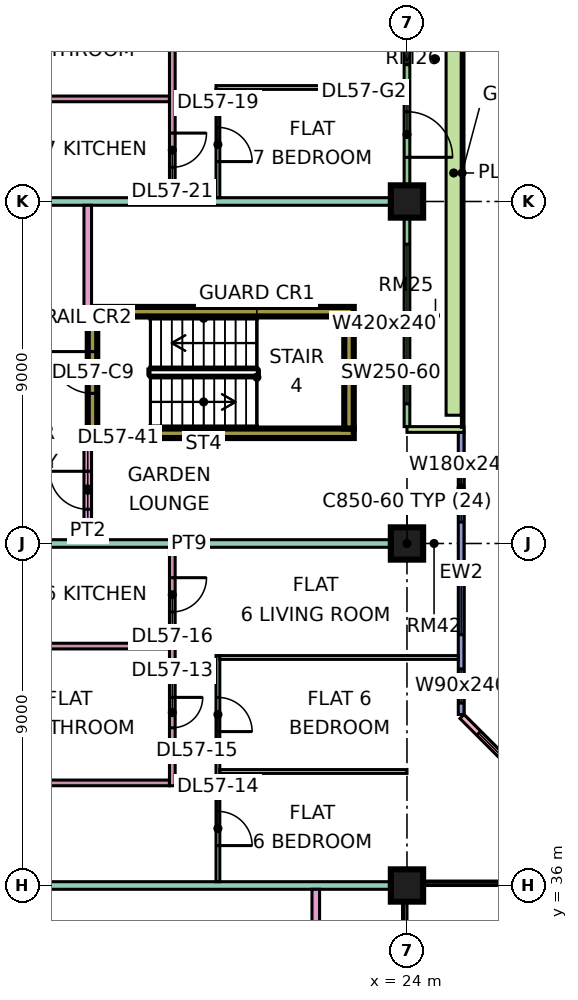
"""IFC4 building model, lengths in metres.
Left out: names, types, materials, properties, quantities, classifications, styles, units other than length and angle.
Written with IfcOpenShell. Run it as: python <this file> out.ifc"""

import sys

from ifc_helpers import new_model, si_unit, direction, frame, frame_2d, origin, origin_2d, place, context, subcontext, project, spatial, rectangle, extrude, element, fill, save


model = new_model("IFC4")
c1 = context("Model", 3, precision=1e-05, world=origin(), true_north=direction((0.0, 1.0)))
c2 = subcontext(c1, "Body", "Model", "MODEL_VIEW")
j1 = project(units=[si_unit("LENGTHUNIT", "METRE"), si_unit("PLANEANGLEUNIT", "RADIAN")], contexts=[c1])
p1 = place(None, origin())
s1 = spatial("IfcSite", under=j1, at=p1, CompositionType="ELEMENT")
p2 = place(p1, origin())
s2 = spatial("IfcBuilding", under=s1, at=p2, CompositionType="ELEMENT")
p3 = place(p2, frame((0.0, 0.0, 241.65)))
s3 = spatial("IfcBuildingStorey", under=s2, at=p3, CompositionType="ELEMENT", Elevation=241.65)
for number, where, z_axis, x_axis in (
    (1, (24.0, 36.0, 0.0), (0.0, 0.0, 1.0), (1.0, 0.0, 0.0)),
    (2, (24.0, 45.0, 0.0), (0.0, 0.0, 1.0), (1.0, 0.0, 0.0)),
    (3, (24.0, 54.0, 0.0), (0.0, 0.0, 1.0), (1.0, 0.0, 0.0)),
):
    element("IfcColumn", number, at=place(p3, frame(where, z_axis=z_axis, x_axis=x_axis)), inside=s3, PredefinedType="COLUMN", context=c2, shape_type="SweptSolid", body=[
        extrude(rectangle(XDim=0.85, YDim=0.85, at=origin_2d()), origin(), (0.0, 0.0, 1.0), 3.75),
    ])
for number, where, z_axis, x_axis in (
    (4, (15.6, 47.9, 0.0), (0.0, 0.0, 1.0), (1.0, 0.0, 0.0)),
    (5, (15.6, 51.1, 0.0), (0.0, 0.0, 1.0), (1.0, 0.0, 0.0)),
):
    element("IfcWall", number, at=place(p3, frame(where, z_axis=z_axis, x_axis=x_axis)), inside=s3, PredefinedType="SHEAR", context=c2, shape_type="SweptSolid", body=[
        extrude(rectangle(XDim=7.0, YDim=0.25, at=frame_2d((3.5, 0.0))), origin(), (0.0, 0.0, 1.0), 3.75),
    ])
p4 = place(p3, frame((15.725, 48.025, 0.0), z_axis=(0.0, 0.0, 1.0), x_axis=(0.0, 1.0, 0.0)))
e6 = element("IfcWall", 6, at=p4, inside=s3, PredefinedType="SHEAR", context=c2, shape_type="SweptSolid", body=[
    extrude(rectangle(XDim=2.95, YDim=0.25, at=frame_2d((1.475, 0.0))), origin(), (0.0, 0.0, 1.0), 3.75),
])
p5 = place(p4, frame((0.925, 0.0, 0.0)))
e7 = element("IfcOpeningElement", 7, at=p5, cuts=e6, PredefinedType="OPENING", context=c2, shape_type="SweptSolid", body=[
    extrude(rectangle(XDim=1.1, YDim=2.2, at=frame_2d((0.55, 1.1))), frame((0.0, 0.135, 0.0), z_axis=(0.0, -1.0, 0.0), x_axis=(1.0, 0.0, 0.0)), (0.0, 0.0, 1.0), 0.27),
])
p6 = place(p3, frame((22.475, 48.025, 0.0), z_axis=(0.0, 0.0, 1.0), x_axis=(0.0, 1.0, 0.0)))
e8 = element("IfcWall", 8, at=p6, inside=s3, PredefinedType="SHEAR", context=c2, shape_type="SweptSolid", body=[
    extrude(rectangle(XDim=2.95, YDim=0.25, at=frame_2d((1.475, 0.0))), origin(), (0.0, 0.0, 1.0), 3.75),
])
p7 = place(p3, frame((28.447, 37.447, 0.0), z_axis=(0.0, 0.0, 1.0), x_axis=(-0.707106781187, 0.707106781187, 0.0)))
e9 = element("IfcWall", 9, at=p7, inside=s3, PredefinedType="SOLIDWALL", context=c2, shape_type="SweptSolid", body=[
    extrude(rectangle(XDim=4.243, YDim=0.15, at=frame_2d((2.121, 0.0))), origin(), (0.0, 0.0, 1.0), 3.35),
])
p8 = place(p7, frame((0.621, 0.0, 0.45)))
e10 = element("IfcOpeningElement", 10, at=p8, cuts=e9, PredefinedType="OPENING", context=c2, shape_type="SweptSolid", body=[
    extrude(rectangle(XDim=3.0, YDim=2.4, at=frame_2d((1.5, 1.2))), frame((0.0, 0.085, 0.0), z_axis=(0.0, -1.0, 0.0), x_axis=(1.0, 0.0, 0.0)), (0.0, 0.0, 1.0), 0.17),
])
p9 = place(p3, frame((25.425, 40.5, 0.0), z_axis=(0.0, 0.0, 1.0), x_axis=(0.0, 1.0, 0.0)))
e11 = element("IfcWall", 11, at=p9, inside=s3, PredefinedType="SOLIDWALL", context=c2, shape_type="SweptSolid", body=[
    extrude(rectangle(XDim=7.425, YDim=0.15, at=frame_2d((3.712, 0.0))), origin(), (0.0, 0.0, 1.0), 3.35),
])
p10 = place(p9, frame((0.3, 0.0, 0.45)))
e12 = element("IfcOpeningElement", 12, at=p10, cuts=e11, PredefinedType="OPENING", context=c2, shape_type="SweptSolid", body=[
    extrude(rectangle(XDim=0.9, YDim=2.4, at=frame_2d((0.45, 1.2))), frame((0.0, 0.085, 0.0), z_axis=(0.0, -1.0, 0.0), x_axis=(1.0, 0.0, 0.0)), (0.0, 0.0, 1.0), 0.17),
])
p11 = place(p9, frame((2.1, 0.0, 0.45)))
e13 = element("IfcOpeningElement", 13, at=p11, cuts=e11, PredefinedType="OPENING", context=c2, shape_type="SweptSolid", body=[
    extrude(rectangle(XDim=1.8, YDim=2.4, at=frame_2d((0.9, 1.2))), frame((0.0, 0.085, 0.0), z_axis=(0.0, -1.0, 0.0), x_axis=(1.0, 0.0, 0.0)), (0.0, 0.0, 1.0), 0.17),
])
p12 = place(p9, frame((5.062, 0.0, 0.45)))
e14 = element("IfcOpeningElement", 14, at=p12, cuts=e11, PredefinedType="OPENING", context=c2, shape_type="SweptSolid", body=[
    extrude(rectangle(XDim=1.8, YDim=2.4, at=frame_2d((0.9, 1.2))), frame((0.0, 0.085, 0.0), z_axis=(0.0, -1.0, 0.0), x_axis=(1.0, 0.0, 0.0)), (0.0, 0.0, 1.0), 0.17),
])
p13 = place(p3, frame((24.0, 48.075, 0.0), z_axis=(0.0, 0.0, 1.0), x_axis=(0.0, 1.0, 0.0)))
e15 = element("IfcWall", 15, at=p13, inside=s3, PredefinedType="SOLIDWALL", context=c2, shape_type="SweptSolid", body=[
    extrude(rectangle(XDim=13.35, YDim=0.15, at=frame_2d((6.675, 0.0))), origin(), (0.0, 0.0, 1.0), 3.35),
])
p14 = place(p13, frame((0.6, 0.0, 0.45)))
e16 = element("IfcOpeningElement", 16, at=p14, cuts=e15, PredefinedType="OPENING", context=c2, shape_type="SweptSolid", body=[
    extrude(rectangle(XDim=4.2, YDim=2.4, at=frame_2d((2.1, 1.2))), frame((0.0, 0.085, 0.0), z_axis=(0.0, -1.0, 0.0), x_axis=(1.0, 0.0, 0.0)), (0.0, 0.0, 1.0), 0.17),
])
p15 = place(p13, frame((7.087, 0.0, 0.0)))
e17 = element("IfcOpeningElement", 17, at=p15, cuts=e15, PredefinedType="OPENING", context=c2, shape_type="SweptSolid", body=[
    extrude(rectangle(XDim=1.2, YDim=2.4, at=frame_2d((0.6, 1.2))), frame((0.0, 0.085, 0.0), z_axis=(0.0, -1.0, 0.0), x_axis=(1.0, 0.0, 0.0)), (0.0, 0.0, 1.0), 0.17),
])
p16 = place(p13, frame((9.525, 0.0, 0.45)))
e18 = element("IfcOpeningElement", 18, at=p16, cuts=e15, PredefinedType="OPENING", context=c2, shape_type="SweptSolid", body=[
    extrude(rectangle(XDim=1.8, YDim=2.4, at=frame_2d((0.9, 1.2))), frame((0.0, 0.085, 0.0), z_axis=(0.0, -1.0, 0.0), x_axis=(1.0, 0.0, 0.0)), (0.0, 0.0, 1.0), 0.17),
])
p17 = place(p13, frame((12.188, 0.0, 0.45)))
e19 = element("IfcOpeningElement", 19, at=p17, cuts=e15, PredefinedType="OPENING", context=c2, shape_type="SweptSolid", body=[
    extrude(rectangle(XDim=0.9, YDim=2.4, at=frame_2d((0.45, 1.2))), frame((0.0, 0.085, 0.0), z_axis=(0.0, -1.0, 0.0), x_axis=(1.0, 0.0, 0.0)), (0.0, 0.0, 1.0), 0.17),
])
p18 = place(p3, frame((25.5, 48.0, 0.0), z_axis=(0.0, 0.0, 1.0), x_axis=(-1.0, 0.0, 0.0)))
e20 = element("IfcWall", 20, at=p18, inside=s3, PredefinedType="SOLIDWALL", context=c2, shape_type="SweptSolid", body=[
    extrude(rectangle(XDim=1.5, YDim=0.15, at=frame_2d((0.75, 0.0))), origin(), (0.0, 0.0, 1.0), 3.35),
])
p19 = place(p3, frame((25.229, 48.375, 0.0), z_axis=(0.0, 0.0, 1.0), x_axis=(0.0, 1.0, 0.0)))
e21 = element("IfcWall", 21, at=p19, inside=s3, PredefinedType="SOLIDWALL", context=c2, shape_type="SweptSolid", body=[
    extrude(rectangle(XDim=12.75, YDim=0.4, at=frame_2d((6.375, 0.0))), origin(), (0.0, 0.0, 1.0), 0.7),
])
p20 = place(p3, frame((12.525, 36.0, 0.0), z_axis=(0.0, 0.0, 1.0), x_axis=(1.0, 0.0, 0.0)))
e22 = element("IfcWall", 22, at=p20, inside=s3, PredefinedType="PARTITIONING", context=c2, shape_type="SweptSolid", body=[
    extrude(rectangle(XDim=11.475, YDim=0.2, at=frame_2d((5.738, 0.0))), origin(), (0.0, 0.0, 1.0), 3.35),
])
for number, where, z_axis, x_axis in (
    (23, (12.525, 38.7, 0.0), (0.0, 0.0, 1.0), (1.0, 0.0, 0.0)),
    (24, (12.525, 42.3, 0.0), (0.0, 0.0, 1.0), (1.0, 0.0, 0.0)),
):
    element("IfcWall", number, at=place(p3, frame(where, z_axis=z_axis, x_axis=x_axis)), inside=s3, PredefinedType="PARTITIONING", context=c2, shape_type="SweptSolid", body=[
        extrude(rectangle(XDim=5.225, YDim=0.15, at=frame_2d((2.613, 0.0))), origin(), (0.0, 0.0, 1.0), 3.35),
    ])
p21 = place(p3, frame((12.525, 45.0, 0.0), z_axis=(0.0, 0.0, 1.0), x_axis=(1.0, 0.0, 0.0)))
e25 = element("IfcWall", 25, at=p21, inside=s3, PredefinedType="PARTITIONING", context=c2, shape_type="SweptSolid", body=[
    extrude(rectangle(XDim=11.475, YDim=0.2, at=frame_2d((5.738, 0.0))), origin(), (0.0, 0.0, 1.0), 3.35),
])
p22 = place(p3, frame((12.525, 54.0, 0.0), z_axis=(0.0, 0.0, 1.0), x_axis=(1.0, 0.0, 0.0)))
e26 = element("IfcWall", 26, at=p22, inside=s3, PredefinedType="PARTITIONING", context=c2, shape_type="SweptSolid", body=[
    extrude(rectangle(XDim=11.401, YDim=0.2, at=frame_2d((5.701, 0.0))), origin(), (0.0, 0.0, 1.0), 3.35),
])
p23 = place(p3, frame((12.525, 56.7, 0.0), z_axis=(0.0, 0.0, 1.0), x_axis=(1.0, 0.0, 0.0)))
e27 = element("IfcWall", 27, at=p23, inside=s3, PredefinedType="PARTITIONING", context=c2, shape_type="SweptSolid", body=[
    extrude(rectangle(XDim=5.225, YDim=0.15, at=frame_2d((2.613, 0.0))), origin(), (0.0, 0.0, 1.0), 3.35),
])
p24 = place(p3, frame((15.6, 45.1, 0.0), z_axis=(0.0, 0.0, 1.0), x_axis=(0.0, 1.0, 0.0)))
e28 = element("IfcWall", 28, at=p24, inside=s3, PredefinedType="PARTITIONING", context=c2, shape_type="SweptSolid", body=[
    extrude(rectangle(XDim=2.675, YDim=0.2, at=frame_2d((1.337, 0.0))), origin(), (0.0, 0.0, 1.0), 3.35),
])
p25 = place(p24, frame((0.8, 0.0, 0.0)))
e29 = element("IfcOpeningElement", 29, at=p25, cuts=e28, PredefinedType="OPENING", context=c2, shape_type="SweptSolid", body=[
    extrude(rectangle(XDim=1.0, YDim=2.1, at=frame_2d((0.5, 1.05))), frame((0.0, 0.11, 0.0), z_axis=(0.0, -1.0, 0.0), x_axis=(1.0, 0.0, 0.0)), (0.0, 0.0, 1.0), 0.22),
])
p26 = place(p3, frame((15.6, 51.225, 0.0), z_axis=(0.0, 0.0, 1.0), x_axis=(0.0, 1.0, 0.0)))
e30 = element("IfcWall", 30, at=p26, inside=s3, PredefinedType="PARTITIONING", context=c2, shape_type="SweptSolid", body=[
    extrude(rectangle(XDim=2.675, YDim=0.2, at=frame_2d((1.337, 0.0))), origin(), (0.0, 0.0, 1.0), 3.35),
])
p27 = place(p3, frame((17.825, 38.625, 0.0), z_axis=(0.0, 0.0, 1.0), x_axis=(0.0, 1.0, 0.0)))
e31 = element("IfcWall", 31, at=p27, inside=s3, PredefinedType="PARTITIONING", context=c2, shape_type="SweptSolid", body=[
    extrude(rectangle(XDim=6.275, YDim=0.15, at=frame_2d((3.137, 0.0))), origin(), (0.0, 0.0, 1.0), 3.35),
])
p28 = place(p27, frame((1.525, 0.0, 0.0)))
e32 = element("IfcOpeningElement", 32, at=p28, cuts=e31, PredefinedType="OPENING", context=c2, shape_type="SweptSolid", body=[
    extrude(rectangle(XDim=0.8, YDim=2.1, at=frame_2d((0.4, 1.05))), frame((0.0, 0.085, 0.0), z_axis=(0.0, -1.0, 0.0), x_axis=(1.0, 0.0, 0.0)), (0.0, 0.0, 1.0), 0.17),
])
p29 = place(p27, frame((4.575, 0.0, 0.0)))
e33 = element("IfcOpeningElement", 33, at=p29, cuts=e31, PredefinedType="OPENING", context=c2, shape_type="SweptSolid", body=[
    extrude(rectangle(XDim=0.9, YDim=2.1, at=frame_2d((0.45, 1.05))), frame((0.0, 0.085, 0.0), z_axis=(0.0, -1.0, 0.0), x_axis=(1.0, 0.0, 0.0)), (0.0, 0.0, 1.0), 0.17),
])
p30 = place(p3, frame((17.825, 54.1, 0.0), z_axis=(0.0, 0.0, 1.0), x_axis=(0.0, 1.0, 0.0)))
e34 = element("IfcWall", 34, at=p30, inside=s3, PredefinedType="PARTITIONING", context=c2, shape_type="SweptSolid", body=[
    extrude(rectangle(XDim=5.975, YDim=0.15, at=frame_2d((2.987, 0.0))), origin(), (0.0, 0.0, 1.0), 3.35),
])
p31 = place(p30, frame((3.9, 0.0, 0.0)))
e35 = element("IfcOpeningElement", 35, at=p31, cuts=e34, PredefinedType="OPENING", context=c2, shape_type="SweptSolid", body=[
    extrude(rectangle(XDim=0.8, YDim=2.1, at=frame_2d((0.4, 1.05))), frame((0.0, 0.085, 0.0), z_axis=(0.0, -1.0, 0.0), x_axis=(1.0, 0.0, 0.0)), (0.0, 0.0, 1.0), 0.17),
])
p32 = place(p30, frame((0.8, 0.0, 0.0)))
e36 = element("IfcOpeningElement", 36, at=p32, cuts=e34, PredefinedType="OPENING", context=c2, shape_type="SweptSolid", body=[
    extrude(rectangle(XDim=0.9, YDim=2.1, at=frame_2d((0.45, 1.05))), frame((0.0, 0.085, 0.0), z_axis=(0.0, -1.0, 0.0), x_axis=(1.0, 0.0, 0.0)), (0.0, 0.0, 1.0), 0.17),
])
p33 = place(p3, frame((18.975, 57.0, 0.0), z_axis=(0.0, 0.0, 1.0), x_axis=(1.0, 0.0, 0.0)))
e37 = element("IfcWall", 37, at=p33, inside=s3, PredefinedType="PARTITIONING", context=c2, shape_type="SweptSolid", body=[
    extrude(rectangle(XDim=4.951, YDim=0.1, at=frame_2d((2.476, 0.0))), origin(), (0.0, 0.0, 1.0), 3.35),
])
p34 = place(p3, frame((19.025, 36.1, 0.0), z_axis=(0.0, 0.0, 1.0), x_axis=(0.0, 1.0, 0.0)))
e38 = element("IfcWall", 38, at=p34, inside=s3, PredefinedType="PARTITIONING", context=c2, shape_type="SweptSolid", body=[
    extrude(rectangle(XDim=5.95, YDim=0.1, at=frame_2d((2.975, 0.0))), origin(), (0.0, 0.0, 1.0), 3.35),
])
p35 = place(p34, frame((0.95, 0.0, 0.0)))
e39 = element("IfcOpeningElement", 39, at=p35, cuts=e38, PredefinedType="OPENING", context=c2, shape_type="SweptSolid", body=[
    extrude(rectangle(XDim=0.9, YDim=2.1, at=frame_2d((0.45, 1.05))), frame((0.0, 0.06, 0.0), z_axis=(0.0, -1.0, 0.0), x_axis=(1.0, 0.0, 0.0)), (0.0, 0.0, 1.0), 0.12),
])
p36 = place(p34, frame((3.95, 0.0, 0.0)))
e40 = element("IfcOpeningElement", 40, at=p36, cuts=e38, PredefinedType="OPENING", context=c2, shape_type="SweptSolid", body=[
    extrude(rectangle(XDim=0.9, YDim=2.1, at=frame_2d((0.45, 1.05))), frame((0.0, 0.06, 0.0), z_axis=(0.0, -1.0, 0.0), x_axis=(1.0, 0.0, 0.0)), (0.0, 0.0, 1.0), 0.12),
])
p37 = place(p3, frame((19.025, 54.1, 0.0), z_axis=(0.0, 0.0, 1.0), x_axis=(0.0, 1.0, 0.0)))
e41 = element("IfcWall", 41, at=p37, inside=s3, PredefinedType="PARTITIONING", context=c2, shape_type="SweptSolid", body=[
    extrude(rectangle(XDim=2.85, YDim=0.1, at=frame_2d((1.425, 0.0))), origin(), (0.0, 0.0, 1.0), 3.35),
])
p38 = place(p37, frame((0.95, 0.0, 0.0)))
e42 = element("IfcOpeningElement", 42, at=p38, cuts=e41, PredefinedType="OPENING", context=c2, shape_type="SweptSolid", body=[
    extrude(rectangle(XDim=0.9, YDim=2.1, at=frame_2d((0.45, 1.05))), frame((0.0, 0.06, 0.0), z_axis=(0.0, -1.0, 0.0), x_axis=(1.0, 0.0, 0.0)), (0.0, 0.0, 1.0), 0.12),
])
p39 = place(p3, frame((19.075, 39.0, 0.0), z_axis=(0.0, 0.0, 1.0), x_axis=(1.0, 0.0, 0.0)))
e43 = element("IfcWall", 43, at=p39, inside=s3, PredefinedType="PARTITIONING", context=c2, shape_type="SweptSolid", body=[
    extrude(rectangle(XDim=4.925, YDim=0.1, at=frame_2d((2.462, 0.0))), origin(), (0.0, 0.0, 1.0), 3.35),
])
p40 = place(p3, frame((19.075, 42.0, 0.0), z_axis=(0.0, 0.0, 1.0), x_axis=(1.0, 0.0, 0.0)))
e44 = element("IfcWall", 44, at=p40, inside=s3, PredefinedType="PARTITIONING", context=c2, shape_type="SweptSolid", body=[
    extrude(rectangle(XDim=6.275, YDim=0.1, at=frame_2d((3.138, 0.0))), origin(), (0.0, 0.0, 1.0), 3.35),
])
p41 = place(p3, frame((21.6, 23.9, 0.0), z_axis=(0.0, 0.0, 1.0), x_axis=(0.0, 1.0, 0.0)))
e45 = element("IfcWall", 45, at=p41, inside=s3, PredefinedType="PARTITIONING", context=c2, shape_type="SweptSolid", body=[
    extrude(rectangle(XDim=12.0, YDim=0.2, at=frame_2d((6.0, 0.0))), origin(), (0.0, 0.0, 1.0), 3.35),
])
p42 = place(p8, origin())
e46 = element("IfcWindow", 46, at=p42, inside=s3, PartitioningType="SINGLE_PANEL", PredefinedType="WINDOW", context=c2, shape_type="SweptSolid", body=[
    extrude(rectangle(XDim=3.0, YDim=2.4, at=frame_2d((1.5, 1.2))), frame((0.0, 0.03, 0.0), z_axis=(0.0, -1.0, 0.0), x_axis=(1.0, 0.0, 0.0)), (0.0, 0.0, 1.0), 0.06),
])
fill(e10, e46)
p43 = place(p10, origin())
e47 = element("IfcWindow", 47, at=p43, inside=s3, PartitioningType="SINGLE_PANEL", PredefinedType="WINDOW", context=c2, shape_type="SweptSolid", body=[
    extrude(rectangle(XDim=0.9, YDim=2.4, at=frame_2d((0.45, 1.2))), frame((0.0, 0.03, 0.0), z_axis=(0.0, -1.0, 0.0), x_axis=(1.0, 0.0, 0.0)), (0.0, 0.0, 1.0), 0.06),
])
fill(e12, e47)
p44 = place(p11, origin())
e48 = element("IfcWindow", 48, at=p44, inside=s3, PartitioningType="SINGLE_PANEL", PredefinedType="WINDOW", context=c2, shape_type="SweptSolid", body=[
    extrude(rectangle(XDim=1.8, YDim=2.4, at=frame_2d((0.9, 1.2))), frame((0.0, 0.03, 0.0), z_axis=(0.0, -1.0, 0.0), x_axis=(1.0, 0.0, 0.0)), (0.0, 0.0, 1.0), 0.06),
])
fill(e13, e48)
p45 = place(p12, origin())
e49 = element("IfcWindow", 49, at=p45, inside=s3, PartitioningType="SINGLE_PANEL", PredefinedType="WINDOW", context=c2, shape_type="SweptSolid", body=[
    extrude(rectangle(XDim=1.8, YDim=2.4, at=frame_2d((0.9, 1.2))), frame((0.0, 0.03, 0.0), z_axis=(0.0, -1.0, 0.0), x_axis=(1.0, 0.0, 0.0)), (0.0, 0.0, 1.0), 0.06),
])
fill(e14, e49)
p46 = place(p14, origin())
e50 = element("IfcWindow", 50, at=p46, inside=s3, PartitioningType="SINGLE_PANEL", PredefinedType="WINDOW", context=c2, shape_type="SweptSolid", body=[
    extrude(rectangle(XDim=4.2, YDim=2.4, at=frame_2d((2.1, 1.2))), frame((0.0, 0.03, 0.0), z_axis=(0.0, -1.0, 0.0), x_axis=(1.0, 0.0, 0.0)), (0.0, 0.0, 1.0), 0.06),
])
fill(e16, e50)
p47 = place(p15, frame((1.2, 0.0, 0.0), z_axis=(0.0, 0.0, 1.0), x_axis=(-1.0, 0.0, 0.0)))
e51 = element("IfcDoor", 51, at=p47, inside=s3, OperationType="DOUBLE_DOOR_SINGLE_SWING", PredefinedType="DOOR", context=c2, shape_type="SweptSolid", body=[
    extrude(rectangle(XDim=1.2, YDim=2.4, at=frame_2d((0.6, 1.2))), frame((0.0, 0.025, 0.0), z_axis=(0.0, -1.0, 0.0), x_axis=(1.0, 0.0, 0.0)), (0.0, 0.0, 1.0), 0.05),
])
fill(e17, e51)
p48 = place(p16, origin())
e52 = element("IfcWindow", 52, at=p48, inside=s3, PartitioningType="SINGLE_PANEL", PredefinedType="WINDOW", context=c2, shape_type="SweptSolid", body=[
    extrude(rectangle(XDim=1.8, YDim=2.4, at=frame_2d((0.9, 1.2))), frame((0.0, 0.03, 0.0), z_axis=(0.0, -1.0, 0.0), x_axis=(1.0, 0.0, 0.0)), (0.0, 0.0, 1.0), 0.06),
])
fill(e18, e52)
p49 = place(p5, frame((1.1, 0.0, 0.0), z_axis=(0.0, 0.0, 1.0), x_axis=(-1.0, 0.0, 0.0)))
e53 = element("IfcDoor", 53, at=p49, inside=s3, OperationType="SINGLE_SWING_RIGHT", PredefinedType="DOOR", context=c2, shape_type="SweptSolid", body=[
    extrude(rectangle(XDim=1.1, YDim=2.2, at=frame_2d((0.55, 1.1))), frame((0.0, 0.025, 0.0), z_axis=(0.0, -1.0, 0.0), x_axis=(1.0, 0.0, 0.0)), (0.0, 0.0, 1.0), 0.05),
])
fill(e7, e53)
p50 = place(p28, origin())
e54 = element("IfcDoor", 54, at=p50, inside=s3, OperationType="SINGLE_SWING_RIGHT", PredefinedType="DOOR", context=c2, shape_type="SweptSolid", body=[
    extrude(rectangle(XDim=0.8, YDim=2.1, at=frame_2d((0.4, 1.05))), frame((0.0, 0.025, 0.0), z_axis=(0.0, -1.0, 0.0), x_axis=(1.0, 0.0, 0.0)), (0.0, 0.0, 1.0), 0.05),
])
fill(e32, e54)
p51 = place(p35, frame((0.9, 0.0, 0.0), z_axis=(0.0, 0.0, 1.0), x_axis=(-1.0, 0.0, 0.0)))
e55 = element("IfcDoor", 55, at=p51, inside=s3, OperationType="SINGLE_SWING_LEFT", PredefinedType="DOOR", context=c2, shape_type="SweptSolid", body=[
    extrude(rectangle(XDim=0.9, YDim=2.1, at=frame_2d((0.45, 1.05))), frame((0.0, 0.025, 0.0), z_axis=(0.0, -1.0, 0.0), x_axis=(1.0, 0.0, 0.0)), (0.0, 0.0, 1.0), 0.05),
])
fill(e39, e55)
p52 = place(p36, frame((0.9, 0.0, 0.0), z_axis=(0.0, 0.0, 1.0), x_axis=(-1.0, 0.0, 0.0)))
e56 = element("IfcDoor", 56, at=p52, inside=s3, OperationType="SINGLE_SWING_LEFT", PredefinedType="DOOR", context=c2, shape_type="SweptSolid", body=[
    extrude(rectangle(XDim=0.9, YDim=2.1, at=frame_2d((0.45, 1.05))), frame((0.0, 0.025, 0.0), z_axis=(0.0, -1.0, 0.0), x_axis=(1.0, 0.0, 0.0)), (0.0, 0.0, 1.0), 0.05),
])
fill(e40, e56)
p53 = place(p29, origin())
e57 = element("IfcDoor", 57, at=p53, inside=s3, OperationType="SINGLE_SWING_RIGHT", PredefinedType="DOOR", context=c2, shape_type="SweptSolid", body=[
    extrude(rectangle(XDim=0.9, YDim=2.1, at=frame_2d((0.45, 1.05))), frame((0.0, 0.025, 0.0), z_axis=(0.0, -1.0, 0.0), x_axis=(1.0, 0.0, 0.0)), (0.0, 0.0, 1.0), 0.05),
])
fill(e33, e57)
p54 = place(p38, frame((0.9, 0.0, 0.0), z_axis=(0.0, 0.0, 1.0), x_axis=(-1.0, 0.0, 0.0)))
e58 = element("IfcDoor", 58, at=p54, inside=s3, OperationType="SINGLE_SWING_LEFT", PredefinedType="DOOR", context=c2, shape_type="SweptSolid", body=[
    extrude(rectangle(XDim=0.9, YDim=2.1, at=frame_2d((0.45, 1.05))), frame((0.0, 0.025, 0.0), z_axis=(0.0, -1.0, 0.0), x_axis=(1.0, 0.0, 0.0)), (0.0, 0.0, 1.0), 0.05),
])
fill(e42, e58)
p55 = place(p32, origin())
e59 = element("IfcDoor", 59, at=p55, inside=s3, OperationType="SINGLE_SWING_RIGHT", PredefinedType="DOOR", context=c2, shape_type="SweptSolid", body=[
    extrude(rectangle(XDim=0.9, YDim=2.1, at=frame_2d((0.45, 1.05))), frame((0.0, 0.025, 0.0), z_axis=(0.0, -1.0, 0.0), x_axis=(1.0, 0.0, 0.0)), (0.0, 0.0, 1.0), 0.05),
])
fill(e36, e59)
p56 = place(p25, frame((1.0, 0.0, 0.0), z_axis=(0.0, 0.0, 1.0), x_axis=(-1.0, 0.0, 0.0)))
e60 = element("IfcDoor", 60, at=p56, inside=s3, OperationType="SINGLE_SWING_RIGHT", PredefinedType="DOOR", context=c2, shape_type="SweptSolid", body=[
    extrude(rectangle(XDim=1.0, YDim=2.1, at=frame_2d((0.5, 1.05))), frame((0.0, 0.025, 0.0), z_axis=(0.0, -1.0, 0.0), x_axis=(1.0, 0.0, 0.0)), (0.0, 0.0, 1.0), 0.05),
])
fill(e29, e60)
save(model, sys.argv[1])
